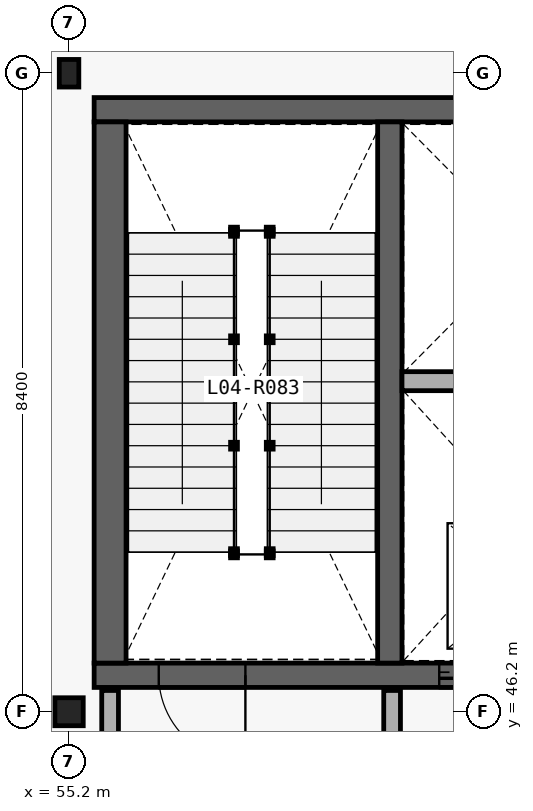
"""IFC4 building model, lengths in metres.
Left out: names, types, materials, properties, quantities, classifications, styles, units other than length and angle.
Written with IfcOpenShell. Run it as: python <this file> out.ifc"""

import sys

from ifc_helpers import new_model, si_unit, direction, frame, frame_2d, origin_with_axes, origin_2d_with_axis, place, context, subcontext, project, spatial, rectangle, i_section, extrude, element, fill, save


model = new_model("IFC4")
c1 = context("Model", 3, precision=1e-05, world=origin_with_axes(), true_north=direction((0.0, 1.0)))
c2 = subcontext(c1, "Body", "Model", "MODEL_VIEW")
j1 = project(units=[si_unit("LENGTHUNIT", "METRE"), si_unit("PLANEANGLEUNIT", "RADIAN")], contexts=[c1])
p1 = place(None, origin_with_axes())
s1 = spatial("IfcSite", under=j1, at=p1, CompositionType="ELEMENT")
p2 = place(p1, origin_with_axes())
s2 = spatial("IfcBuilding", under=s1, at=p2, CompositionType="ELEMENT")
p3 = place(p2, frame((0.0, 0.0, 20.4), z_axis=(0.0, 0.0, 1.0), x_axis=(1.0, 0.0, 0.0)))
s3 = spatial("IfcBuildingStorey", under=s2, at=p3, CompositionType="ELEMENT", Elevation=20.4)
p4 = place(None, frame((55.53, 46.68, 20.4), z_axis=(0.0, 0.0, 1.0), x_axis=(1.0, 0.0, 0.0)))
e1 = element("IfcWall", 1, at=p4, inside=s3, PredefinedType="SHEAR", context=c2, shape_type="SweptSolid", body=[
    extrude(rectangle(XDim=7.74, YDim=0.32, at=frame_2d((3.87, 0.0), x_axis=(1.0, 0.0))), origin_with_axes(), (0.0, 0.0, 1.0), 4.5),
])
p5 = place(None, frame((56.95, 46.68, 20.4), z_axis=(0.0, 0.0, 1.0), x_axis=(1.0, 0.0, 0.0)))
e2 = element("IfcOpeningElement", 2, at=p5, cuts=e1, PredefinedType="OPENING", context=c2, shape_type="SweptSolid", body=[
    extrude(rectangle(XDim=1.14, YDim=2.18, at=frame_2d((0.0, 1.09), x_axis=(1.0, 0.0))), frame((0.0, 0.17, 0.0), z_axis=(0.0, -1.0, 0.0), x_axis=(1.0, 0.0, 0.0)), (0.0, 0.0, 1.0), 0.34),
])
p6 = place(None, frame((60.65, 46.68, 20.4), z_axis=(0.0, 0.0, 1.0), x_axis=(1.0, 0.0, 0.0)))
e3 = element("IfcOpeningElement", 3, at=p6, cuts=e1, PredefinedType="OPENING", context=c2, shape_type="SweptSolid", body=[
    extrude(rectangle(XDim=1.16, YDim=2.2, at=frame_2d((0.0, 1.1), x_axis=(1.0, 0.0))), frame((0.0, 0.17, 0.0), z_axis=(0.0, -1.0, 0.0), x_axis=(1.0, 0.0, 0.0)), (0.0, 0.0, 1.0), 0.34),
])
p7 = place(None, frame((63.27, 54.12, 20.4), z_axis=(0.0, 0.0, 1.0), x_axis=(-1.0, 0.0, 0.0)))
e4 = element("IfcWall", 4, at=p7, inside=s3, PredefinedType="SHEAR", context=c2, shape_type="SweptSolid", body=[
    extrude(rectangle(XDim=7.74, YDim=0.32, at=frame_2d((3.87, 0.0), x_axis=(1.0, 0.0))), origin_with_axes(), (0.0, 0.0, 1.0), 4.5),
])
p8 = place(None, frame((55.74, 53.96, 20.4), z_axis=(0.0, 0.0, 1.0), x_axis=(0.0, -1.0, 0.0)))
e5 = element("IfcWall", 5, at=p8, inside=s3, PredefinedType="SHEAR", context=c2, shape_type="SweptSolid", body=[
    extrude(rectangle(XDim=7.12, YDim=0.42, at=frame_2d((3.56, 0.0), x_axis=(1.0, 0.0))), origin_with_axes(), (0.0, 0.0, 1.0), 4.5),
])
p9 = place(None, frame((59.42, 46.84, 20.4), z_axis=(0.0, 0.0, 1.0), x_axis=(0.0, 1.0, 0.0)))
e6 = element("IfcWall", 6, at=p9, inside=s3, PredefinedType="SHEAR", context=c2, shape_type="SweptSolid", body=[
    extrude(rectangle(XDim=7.12, YDim=0.32, at=frame_2d((3.56, 0.0), x_axis=(1.0, 0.0))), origin_with_axes(), (0.0, 0.0, 1.0), 4.5),
])
p10 = place(None, frame((59.58, 50.549, 20.4), z_axis=(0.0, 0.0, 1.0), x_axis=(1.0, 0.0, 0.0)))
e7 = element("IfcWall", 7, at=p10, inside=s3, PredefinedType="PARTITIONING", context=c2, shape_type="SweptSolid", body=[
    extrude(rectangle(XDim=3.27, YDim=0.25, at=frame_2d((1.635, 0.0), x_axis=(1.0, 0.0))), origin_with_axes(), (0.0, 0.0, 1.0), 4.18),
])
for number, where, z_axis, x_axis in (
    (8, (55.74, 45.22, 20.4), (0.0, 0.0, 1.0), (0.0, 1.0, 0.0)),
    (9, (59.45, 45.22, 20.4), (0.0, 0.0, 1.0), (0.0, 1.0, 0.0)),
):
    element("IfcWall", number, at=place(None, frame(where, z_axis=z_axis, x_axis=x_axis)), inside=s3, PredefinedType="PARTITIONING", context=c2, shape_type="SweptSolid", body=[
        extrude(rectangle(XDim=1.26, YDim=0.22, at=frame_2d((0.63, 0.0), x_axis=(1.0, 0.0))), origin_with_axes(), (0.0, 0.0, 1.0), 4.18),
    ])
p11 = place(None, frame((55.2, 46.2, 20.4), z_axis=(0.0, 0.0, 1.0), x_axis=(1.0, 0.0, 0.0)))
e10 = element("IfcColumn", 10, at=p11, inside=s3, PredefinedType="COLUMN", context=c2, shape_type="SweptSolid", body=[
    extrude(i_section(OverallWidth=0.373, OverallDepth=0.368, WebThickness=0.015, FlangeThickness=0.024, at=origin_2d_with_axis()), origin_with_axes(), (0.0, 0.0, 1.0), 4.5),
])
p12 = place(None, frame((55.2, 54.6, 20.4), z_axis=(0.0, 0.0, 1.0), x_axis=(1.0, 0.0, 0.0)))
e11 = element("IfcColumn", 11, at=p12, inside=s3, PredefinedType="COLUMN", context=c2, shape_type="SweptSolid", body=[
    extrude(i_section(OverallWidth=0.257, OverallDepth=0.363, WebThickness=0.013, FlangeThickness=0.022, at=origin_2d_with_axis()), origin_with_axes(), (0.0, 0.0, 1.0), 4.5),
])
p13 = place(None, frame((56.95, 46.68, 20.4), z_axis=(0.0, 0.0, 1.0), x_axis=(-1.0, 0.0, 0.0)))
e12 = element("IfcDoor", 12, at=p13, inside=s3, OperationType="SINGLE_SWING_RIGHT", PredefinedType="DOOR", context=c2, shape_type="SweptSolid", body=[
    extrude(rectangle(XDim=1.14, YDim=2.18, at=frame_2d((0.0, 1.09), x_axis=(1.0, 0.0))), frame((0.0, 0.04, 0.0), z_axis=(0.0, -1.0, 0.0), x_axis=(1.0, 0.0, 0.0)), (0.0, 0.0, 1.0), 0.08),
])
fill(e2, e12)
p14 = place(None, frame((60.65, 46.68, 20.4), z_axis=(0.0, 0.0, 1.0), x_axis=(-1.0, 0.0, 0.0)))
e13 = element("IfcDoor", 13, at=p14, inside=s3, OperationType="SLIDING_TO_LEFT", PredefinedType="DOOR", context=c2, shape_type="SweptSolid", body=[
    extrude(rectangle(XDim=1.16, YDim=2.2, at=frame_2d((0.0, 1.1), x_axis=(1.0, 0.0))), frame((0.0, 0.04, 0.0), z_axis=(0.0, -1.0, 0.0), x_axis=(1.0, 0.0, 0.0)), (0.0, 0.0, 1.0), 0.08),
])
fill(e3, e13)
save(model, sys.argv[1])
